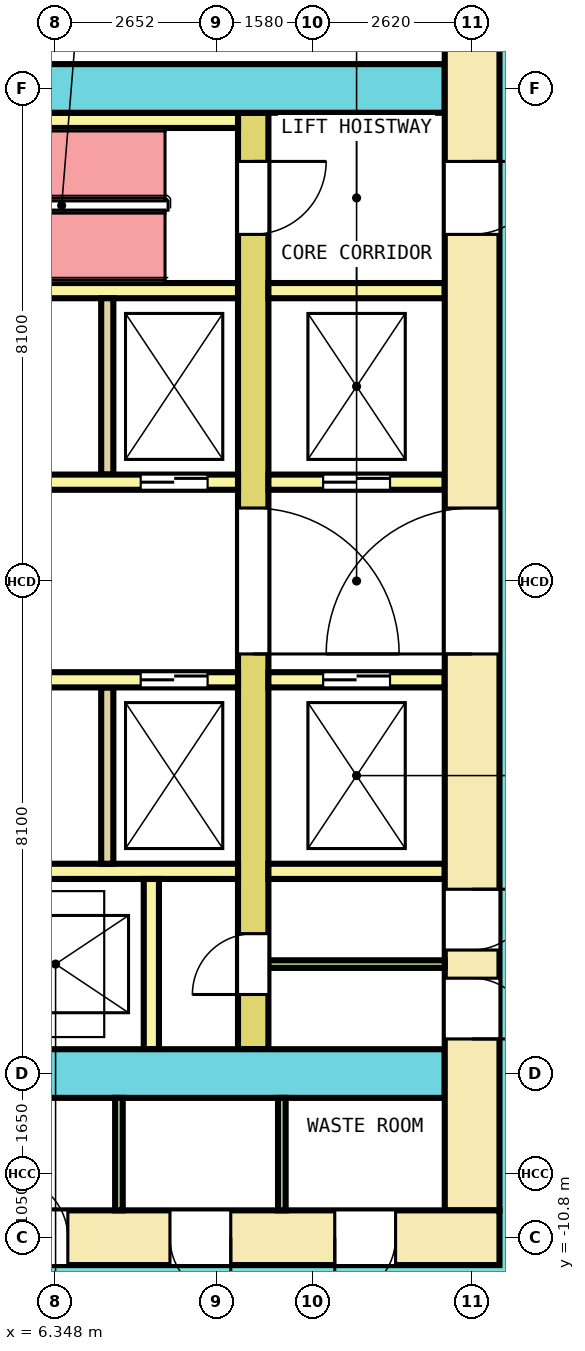
"""IFC4 building model, lengths in metres.
Left out: names, types, materials, properties, quantities, classifications, styles, units other than length and angle.
Written with IfcOpenShell. Run it as: python <this file> out.ifc"""

import sys

from ifc_helpers import new_model, si_unit, direction, frame, frame_2d, origin, place, context, subcontext, project, spatial, rectangle, extrude, element, fill, save


model = new_model("IFC4")
c1 = context("Model", 3, precision=1e-05, world=origin(), true_north=direction((0.0, 1.0)))
c2 = subcontext(c1, "Body", "Model", "MODEL_VIEW")
j1 = project(units=[si_unit("LENGTHUNIT", "METRE"), si_unit("PLANEANGLEUNIT", "RADIAN")], contexts=[c1])
p1 = place(None, origin())
s1 = spatial("IfcSite", under=j1, at=p1, CompositionType="ELEMENT")
p2 = place(p1, origin())
s2 = spatial("IfcBuilding", under=s1, at=p2, CompositionType="ELEMENT")
p3 = place(p2, frame((0.0, 0.0, 10.2)))
s3 = spatial("IfcBuildingStorey", under=s2, at=p3, CompositionType="ELEMENT", Elevation=10.2)
p4 = place(p3, frame((-13.65, -10.8, 0.0), z_axis=(0.0, 0.0, 1.0), x_axis=(1.0, 0.0, 0.0)))
e1 = element("IfcWall", 1, at=p4, inside=s3, PredefinedType="SHEAR", context=c2, shape_type="SweptSolid", body=[
    extrude(rectangle(XDim=27.3, YDim=0.9, at=frame_2d((13.65, 0.0))), origin(), (0.0, 0.0, 1.0), 4.1),
])
p5 = place(p4, frame((2.425, 0.0, 0.0)))
e2 = element("IfcOpeningElement", 2, at=p5, cuts=e1, PredefinedType="OPENING", context=c2, shape_type="SweptSolid", body=[
    extrude(rectangle(XDim=1.0, YDim=2.1, at=frame_2d((0.5, 1.05))), frame((0.0, 0.46, 0.0), z_axis=(0.0, -1.0, 0.0), x_axis=(1.0, 0.0, 0.0)), (0.0, 0.0, 1.0), 0.92),
])
p6 = place(p4, frame((6.569, 0.0, 0.0)))
e3 = element("IfcOpeningElement", 3, at=p6, cuts=e1, PredefinedType="OPENING", context=c2, shape_type="SweptSolid", body=[
    extrude(rectangle(XDim=1.0, YDim=2.1, at=frame_2d((0.5, 1.05))), frame((0.0, 0.46, 0.0), z_axis=(0.0, -1.0, 0.0), x_axis=(1.0, 0.0, 0.0)), (0.0, 0.0, 1.0), 0.92),
])
p7 = place(p4, frame((10.681, 0.0, 0.0)))
e4 = element("IfcOpeningElement", 4, at=p7, cuts=e1, PredefinedType="OPENING", context=c2, shape_type="SweptSolid", body=[
    extrude(rectangle(XDim=1.0, YDim=2.1, at=frame_2d((0.5, 1.05))), frame((0.0, 0.46, 0.0), z_axis=(0.0, -1.0, 0.0), x_axis=(1.0, 0.0, 0.0)), (0.0, 0.0, 1.0), 0.92),
])
p8 = place(p4, frame((19.202, 0.0, 0.0)))
e5 = element("IfcOpeningElement", 5, at=p8, cuts=e1, PredefinedType="OPENING", context=c2, shape_type="SweptSolid", body=[
    extrude(rectangle(XDim=1.0, YDim=2.1, at=frame_2d((0.5, 1.05))), frame((0.0, 0.46, 0.0), z_axis=(0.0, -1.0, 0.0), x_axis=(1.0, 0.0, 0.0)), (0.0, 0.0, 1.0), 0.92),
])
p9 = place(p4, frame((21.881, 0.0, 0.0)))
e6 = element("IfcOpeningElement", 6, at=p9, cuts=e1, PredefinedType="OPENING", context=c2, shape_type="SweptSolid", body=[
    extrude(rectangle(XDim=1.0, YDim=2.1, at=frame_2d((0.5, 1.05))), frame((0.0, 0.46, 0.0), z_axis=(0.0, -1.0, 0.0), x_axis=(1.0, 0.0, 0.0)), (0.0, 0.0, 1.0), 0.92),
])
p10 = place(p4, frame((24.592, 0.0, 0.0)))
e7 = element("IfcOpeningElement", 7, at=p10, cuts=e1, PredefinedType="OPENING", context=c2, shape_type="SweptSolid", body=[
    extrude(rectangle(XDim=1.0, YDim=2.1, at=frame_2d((0.5, 1.05))), frame((0.0, 0.46, 0.0), z_axis=(0.0, -1.0, 0.0), x_axis=(1.0, 0.0, 0.0)), (0.0, 0.0, 1.0), 0.92),
])
p11 = place(p4, frame((15.2, 0.0, 0.0)))
e8 = element("IfcOpeningElement", 8, at=p11, cuts=e1, PredefinedType="OPENING", context=c2, shape_type="SweptSolid", body=[
    extrude(rectangle(XDim=1.2, YDim=2.1, at=frame_2d((0.6, 1.05))), frame((0.0, 0.46, 0.0), z_axis=(0.0, -1.0, 0.0), x_axis=(1.0, 0.0, 0.0)), (0.0, 0.0, 1.0), 0.92),
])
p12 = place(p3, frame((13.2, -10.35, 0.0), z_axis=(0.0, 0.0, 1.0), x_axis=(0.0, 1.0, 0.0)))
e9 = element("IfcWall", 9, at=p12, inside=s3, PredefinedType="SHEAR", context=c2, shape_type="SweptSolid", body=[
    extrude(rectangle(XDim=20.7, YDim=0.9, at=frame_2d((10.35, 0.0))), origin(), (0.0, 0.0, 1.0), 4.1),
])
p13 = place(p12, frame((9.15, 0.0, 0.0)))
e10 = element("IfcOpeningElement", 10, at=p13, cuts=e9, PredefinedType="OPENING", context=c2, shape_type="SweptSolid", body=[
    extrude(rectangle(XDim=2.4, YDim=2.1, at=frame_2d((1.2, 1.05))), frame((0.0, 0.46, 0.0), z_axis=(0.0, -1.0, 0.0), x_axis=(1.0, 0.0, 0.0)), (0.0, 0.0, 1.0), 0.92),
])
p14 = place(p12, frame((16.05, 0.0, 0.0)))
e11 = element("IfcOpeningElement", 11, at=p14, cuts=e9, PredefinedType="OPENING", context=c2, shape_type="SweptSolid", body=[
    extrude(rectangle(XDim=1.2, YDim=2.1, at=frame_2d((0.6, 1.05))), frame((0.0, 0.46, 0.0), z_axis=(0.0, -1.0, 0.0), x_axis=(1.0, 0.0, 0.0)), (0.0, 0.0, 1.0), 0.92),
])
p15 = place(p12, frame((2.819, 0.0, 0.0)))
e12 = element("IfcOpeningElement", 12, at=p15, cuts=e9, PredefinedType="OPENING", context=c2, shape_type="SweptSolid", body=[
    extrude(rectangle(XDim=1.0, YDim=2.1, at=frame_2d((0.5, 1.05))), frame((0.0, 0.46, 0.0), z_axis=(0.0, -1.0, 0.0), x_axis=(1.0, 0.0, 0.0)), (0.0, 0.0, 1.0), 0.92),
])
p16 = place(p12, frame((4.281, 0.0, 0.0)))
e13 = element("IfcOpeningElement", 13, at=p16, cuts=e9, PredefinedType="OPENING", context=c2, shape_type="SweptSolid", body=[
    extrude(rectangle(XDim=1.0, YDim=2.1, at=frame_2d((0.5, 1.05))), frame((0.0, 0.46, 0.0), z_axis=(0.0, -1.0, 0.0), x_axis=(1.0, 0.0, 0.0)), (0.0, 0.0, 1.0), 0.92),
])
p17 = place(p3, frame((-12.75, 8.1, 0.0), z_axis=(0.0, 0.0, 1.0), x_axis=(1.0, 0.0, 0.0)))
e14 = element("IfcWall", 14, at=p17, inside=s3, PredefinedType="SHEAR", context=c2, shape_type="SweptSolid", body=[
    extrude(rectangle(XDim=25.5, YDim=0.8, at=frame_2d((12.75, 0.0))), origin(), (0.0, 0.0, 1.0), 4.1),
])
p18 = place(p17, frame((13.675, 0.0, 0.0)))
e15 = element("IfcOpeningElement", 15, at=p18, cuts=e14, PredefinedType="OPENING", context=c2, shape_type="SweptSolid", body=[
    extrude(rectangle(XDim=1.4, YDim=2.1, at=frame_2d((0.7, 1.05))), frame((0.0, 0.41, 0.0), z_axis=(0.0, -1.0, 0.0), x_axis=(1.0, 0.0, 0.0)), (0.0, 0.0, 1.0), 0.82),
])
p19 = place(p3, frame((-12.75, -8.1, 0.0), z_axis=(0.0, 0.0, 1.0), x_axis=(1.0, 0.0, 0.0)))
e16 = element("IfcWall", 16, at=p19, inside=s3, PredefinedType="SHEAR", context=c2, shape_type="SweptSolid", body=[
    extrude(rectangle(XDim=25.5, YDim=0.8, at=frame_2d((12.75, 0.0))), origin(), (0.0, 0.0, 1.0), 4.1),
])
p20 = place(p19, frame((14.3, 0.0, 0.0)))
e17 = element("IfcOpeningElement", 17, at=p20, cuts=e16, PredefinedType="OPENING", context=c2, shape_type="SweptSolid", body=[
    extrude(rectangle(XDim=1.2, YDim=2.1, at=frame_2d((0.6, 1.05))), frame((0.0, 0.41, 0.0), z_axis=(0.0, -1.0, 0.0), x_axis=(1.0, 0.0, 0.0)), (0.0, 0.0, 1.0), 0.82),
])
p21 = place(p3, frame((9.6, -7.7, 0.0), z_axis=(0.0, 0.0, 1.0), x_axis=(0.0, 1.0, 0.0)))
e18 = element("IfcWall", 18, at=p21, inside=s3, PredefinedType="SHEAR", context=c2, shape_type="SweptSolid", body=[
    extrude(rectangle(XDim=15.4, YDim=0.5, at=frame_2d((7.7, 0.0))), origin(), (0.0, 0.0, 1.0), 4.1),
])
p22 = place(p21, frame((6.5, 0.0, 0.0)))
e19 = element("IfcOpeningElement", 19, at=p22, cuts=e18, PredefinedType="OPENING", context=c2, shape_type="SweptSolid", body=[
    extrude(rectangle(XDim=2.4, YDim=2.1, at=frame_2d((1.2, 1.05))), frame((0.0, 0.26, 0.0), z_axis=(0.0, -1.0, 0.0), x_axis=(1.0, 0.0, 0.0)), (0.0, 0.0, 1.0), 0.52),
])
p23 = place(p21, frame((13.4, 0.0, 0.0)))
e20 = element("IfcOpeningElement", 20, at=p23, cuts=e18, PredefinedType="OPENING", context=c2, shape_type="SweptSolid", body=[
    extrude(rectangle(XDim=1.2, YDim=2.1, at=frame_2d((0.6, 1.05))), frame((0.0, 0.26, 0.0), z_axis=(0.0, -1.0, 0.0), x_axis=(1.0, 0.0, 0.0)), (0.0, 0.0, 1.0), 0.52),
])
p24 = place(p21, frame((0.9, 0.0, 0.0)))
e21 = element("IfcOpeningElement", 21, at=p24, cuts=e18, PredefinedType="OPENING", context=c2, shape_type="SweptSolid", body=[
    extrude(rectangle(XDim=1.0, YDim=2.1, at=frame_2d((0.5, 1.05))), frame((0.0, 0.26, 0.0), z_axis=(0.0, -1.0, 0.0), x_axis=(1.0, 0.0, 0.0)), (0.0, 0.0, 1.0), 0.52),
])
p25 = place(p3, frame((-9.35, 1.625, 0.0), z_axis=(0.0, 0.0, 1.0), x_axis=(1.0, 0.0, 0.0)))
e22 = element("IfcWall", 22, at=p25, inside=s3, PredefinedType="SOLIDWALL", context=c2, shape_type="SweptSolid", body=[
    extrude(rectangle(XDim=18.7, YDim=0.25, at=frame_2d((9.35, 0.0))), origin(), (0.0, 0.0, 1.0), 4.1),
])
p26 = place(p25, frame((0.5, 0.0, 0.0)))
e23 = element("IfcOpeningElement", 23, at=p26, cuts=e22, PredefinedType="OPENING", context=c2, shape_type="SweptSolid", body=[
    extrude(rectangle(XDim=1.1, YDim=2.1, at=frame_2d((0.55, 1.05))), frame((0.0, 0.135, 0.0), z_axis=(0.0, -1.0, 0.0), x_axis=(1.0, 0.0, 0.0)), (0.0, 0.0, 1.0), 0.27),
])
p27 = place(p25, frame((17.1, 0.0, 0.0)))
e24 = element("IfcOpeningElement", 24, at=p27, cuts=e22, PredefinedType="OPENING", context=c2, shape_type="SweptSolid", body=[
    extrude(rectangle(XDim=1.1, YDim=2.1, at=frame_2d((0.55, 1.05))), frame((0.0, 0.135, 0.0), z_axis=(0.0, -1.0, 0.0), x_axis=(1.0, 0.0, 0.0)), (0.0, 0.0, 1.0), 0.27),
])
p28 = place(p3, frame((9.85, 1.625, 0.0), z_axis=(0.0, 0.0, 1.0), x_axis=(1.0, 0.0, 0.0)))
e25 = element("IfcWall", 25, at=p28, inside=s3, PredefinedType="SOLIDWALL", context=c2, shape_type="SweptSolid", body=[
    extrude(rectangle(XDim=2.9, YDim=0.25, at=frame_2d((1.45, 0.0))), origin(), (0.0, 0.0, 1.0), 4.1),
])
p29 = place(p28, frame((0.9, 0.0, 0.0)))
e26 = element("IfcOpeningElement", 26, at=p29, cuts=e25, PredefinedType="OPENING", context=c2, shape_type="SweptSolid", body=[
    extrude(rectangle(XDim=1.1, YDim=2.1, at=frame_2d((0.55, 1.05))), frame((0.0, 0.135, 0.0), z_axis=(0.0, -1.0, 0.0), x_axis=(1.0, 0.0, 0.0)), (0.0, 0.0, 1.0), 0.27),
])
p30 = place(p3, frame((-9.35, 4.775, 0.0), z_axis=(0.0, 0.0, 1.0), x_axis=(1.0, 0.0, 0.0)))
e27 = element("IfcWall", 27, at=p30, inside=s3, PredefinedType="SOLIDWALL", context=c2, shape_type="SweptSolid", body=[
    extrude(rectangle(XDim=18.7, YDim=0.25, at=frame_2d((9.35, 0.0))), origin(), (0.0, 0.0, 1.0), 4.1),
])
p31 = place(p3, frame((9.85, 4.775, 0.0), z_axis=(0.0, 0.0, 1.0), x_axis=(1.0, 0.0, 0.0)))
e28 = element("IfcWall", 28, at=p31, inside=s3, PredefinedType="SOLIDWALL", context=c2, shape_type="SweptSolid", body=[
    extrude(rectangle(XDim=2.9, YDim=0.25, at=frame_2d((1.45, 0.0))), origin(), (0.0, 0.0, 1.0), 4.1),
])
p32 = place(p3, frame((7.2, 1.75, 0.0), z_axis=(0.0, 0.0, 1.0), x_axis=(0.0, 1.0, 0.0)))
e29 = element("IfcWall", 29, at=p32, inside=s3, PredefinedType="SOLIDWALL", context=c2, shape_type="SweptSolid", body=[
    extrude(rectangle(XDim=2.9, YDim=0.2, at=frame_2d((1.45, 0.0))), origin(), (0.0, 0.0, 1.0), 4.1),
])
p33 = place(p3, frame((-9.35, -1.625, 0.0), z_axis=(0.0, 0.0, 1.0), x_axis=(1.0, 0.0, 0.0)))
e30 = element("IfcWall", 30, at=p33, inside=s3, PredefinedType="SOLIDWALL", context=c2, shape_type="SweptSolid", body=[
    extrude(rectangle(XDim=18.7, YDim=0.25, at=frame_2d((9.35, 0.0))), origin(), (0.0, 0.0, 1.0), 4.1),
])
p34 = place(p33, frame((0.5, 0.0, 0.0)))
e31 = element("IfcOpeningElement", 31, at=p34, cuts=e30, PredefinedType="OPENING", context=c2, shape_type="SweptSolid", body=[
    extrude(rectangle(XDim=1.1, YDim=2.1, at=frame_2d((0.55, 1.05))), frame((0.0, 0.135, 0.0), z_axis=(0.0, -1.0, 0.0), x_axis=(1.0, 0.0, 0.0)), (0.0, 0.0, 1.0), 0.27),
])
p35 = place(p33, frame((17.1, 0.0, 0.0)))
e32 = element("IfcOpeningElement", 32, at=p35, cuts=e30, PredefinedType="OPENING", context=c2, shape_type="SweptSolid", body=[
    extrude(rectangle(XDim=1.1, YDim=2.1, at=frame_2d((0.55, 1.05))), frame((0.0, 0.135, 0.0), z_axis=(0.0, -1.0, 0.0), x_axis=(1.0, 0.0, 0.0)), (0.0, 0.0, 1.0), 0.27),
])
p36 = place(p3, frame((9.85, -1.625, 0.0), z_axis=(0.0, 0.0, 1.0), x_axis=(1.0, 0.0, 0.0)))
e33 = element("IfcWall", 33, at=p36, inside=s3, PredefinedType="SOLIDWALL", context=c2, shape_type="SweptSolid", body=[
    extrude(rectangle(XDim=2.9, YDim=0.25, at=frame_2d((1.45, 0.0))), origin(), (0.0, 0.0, 1.0), 4.1),
])
p37 = place(p36, frame((0.9, 0.0, 0.0)))
e34 = element("IfcOpeningElement", 34, at=p37, cuts=e33, PredefinedType="OPENING", context=c2, shape_type="SweptSolid", body=[
    extrude(rectangle(XDim=1.1, YDim=2.1, at=frame_2d((0.55, 1.05))), frame((0.0, 0.135, 0.0), z_axis=(0.0, -1.0, 0.0), x_axis=(1.0, 0.0, 0.0)), (0.0, 0.0, 1.0), 0.27),
])
p38 = place(p3, frame((-9.35, -4.775, 0.0), z_axis=(0.0, 0.0, 1.0), x_axis=(1.0, 0.0, 0.0)))
e35 = element("IfcWall", 35, at=p38, inside=s3, PredefinedType="SOLIDWALL", context=c2, shape_type="SweptSolid", body=[
    extrude(rectangle(XDim=18.7, YDim=0.25, at=frame_2d((9.35, 0.0))), origin(), (0.0, 0.0, 1.0), 4.1),
])
p39 = place(p3, frame((9.85, -4.775, 0.0), z_axis=(0.0, 0.0, 1.0), x_axis=(1.0, 0.0, 0.0)))
e36 = element("IfcWall", 36, at=p39, inside=s3, PredefinedType="SOLIDWALL", context=c2, shape_type="SweptSolid", body=[
    extrude(rectangle(XDim=2.9, YDim=0.25, at=frame_2d((1.45, 0.0))), origin(), (0.0, 0.0, 1.0), 4.1),
])
p40 = place(p3, frame((7.2, -4.65, 0.0), z_axis=(0.0, 0.0, 1.0), x_axis=(0.0, 1.0, 0.0)))
e37 = element("IfcWall", 37, at=p40, inside=s3, PredefinedType="SOLIDWALL", context=c2, shape_type="SweptSolid", body=[
    extrude(rectangle(XDim=2.9, YDim=0.2, at=frame_2d((1.45, 0.0))), origin(), (0.0, 0.0, 1.0), 4.1),
])
p41 = place(p3, frame((3.55, 7.575, 0.0), z_axis=(0.0, 0.0, 1.0), x_axis=(1.0, 0.0, 0.0)))
e38 = element("IfcWall", 38, at=p41, inside=s3, PredefinedType="SOLIDWALL", context=c2, shape_type="SweptSolid", body=[
    extrude(rectangle(XDim=5.8, YDim=0.25, at=frame_2d((2.9, 0.0))), origin(), (0.0, 0.0, 1.0), 4.1),
])
p42 = place(p3, frame((7.925, -7.7, 0.0), z_axis=(0.0, 0.0, 1.0), x_axis=(0.0, 1.0, 0.0)))
e39 = element("IfcWall", 39, at=p42, inside=s3, PredefinedType="SOLIDWALL", context=c2, shape_type="SweptSolid", body=[
    extrude(rectangle(XDim=2.8, YDim=0.25, at=frame_2d((1.4, 0.0))), origin(), (0.0, 0.0, 1.0), 4.1),
])
p43 = place(p3, frame((9.85, -6.3, 0.0), z_axis=(0.0, 0.0, 1.0), x_axis=(1.0, 0.0, 0.0)))
e40 = element("IfcWall", 40, at=p43, inside=s3, PredefinedType="PARTITIONING", context=c2, shape_type="SweptSolid", body=[
    extrude(rectangle(XDim=2.9, YDim=0.125, at=frame_2d((1.45, 0.0))), origin(), (0.0, 0.0, 1.0), 4.1),
])
for number, where, z_axis, x_axis in (
    (41, (7.392, -10.35, 0.0), (0.0, 0.0, 1.0), (0.0, 1.0, 0.0)),
    (42, (10.071, -10.35, 0.0), (0.0, 0.0, 1.0), (0.0, 1.0, 0.0)),
):
    element("IfcWall", number, at=place(p3, frame(where, z_axis=z_axis, x_axis=x_axis)), inside=s3, PredefinedType="PARTITIONING", context=c2, shape_type="SweptSolid", body=[
        extrude(rectangle(XDim=1.85, YDim=0.125, at=frame_2d((0.925, 0.0))), origin(), (0.0, 0.0, 1.0), 4.1),
    ])
p44 = place(p27, origin())
e43 = element("IfcDoor", 43, at=p44, inside=s3, OperationType="DOUBLE_DOOR_SLIDING", PredefinedType="DOOR", context=c2, shape_type="SweptSolid", body=[
    extrude(rectangle(XDim=1.1, YDim=2.1, at=frame_2d((0.55, 1.05))), frame((0.0, 0.075, 0.0), z_axis=(0.0, -1.0, 0.0), x_axis=(1.0, 0.0, 0.0)), (0.0, 0.0, 1.0), 0.15),
])
fill(e24, e43)
p45 = place(p29, origin())
e44 = element("IfcDoor", 44, at=p45, inside=s3, OperationType="DOUBLE_DOOR_SLIDING", PredefinedType="DOOR", context=c2, shape_type="SweptSolid", body=[
    extrude(rectangle(XDim=1.1, YDim=2.1, at=frame_2d((0.55, 1.05))), frame((0.0, 0.075, 0.0), z_axis=(0.0, -1.0, 0.0), x_axis=(1.0, 0.0, 0.0)), (0.0, 0.0, 1.0), 0.15),
])
fill(e26, e44)
p46 = place(p35, origin())
e45 = element("IfcDoor", 45, at=p46, inside=s3, OperationType="DOUBLE_DOOR_SLIDING", PredefinedType="DOOR", context=c2, shape_type="SweptSolid", body=[
    extrude(rectangle(XDim=1.1, YDim=2.1, at=frame_2d((0.55, 1.05))), frame((0.0, 0.075, 0.0), z_axis=(0.0, -1.0, 0.0), x_axis=(1.0, 0.0, 0.0)), (0.0, 0.0, 1.0), 0.15),
])
fill(e32, e45)
p47 = place(p37, origin())
e46 = element("IfcDoor", 46, at=p47, inside=s3, OperationType="DOUBLE_DOOR_SLIDING", PredefinedType="DOOR", context=c2, shape_type="SweptSolid", body=[
    extrude(rectangle(XDim=1.1, YDim=2.1, at=frame_2d((0.55, 1.05))), frame((0.0, 0.075, 0.0), z_axis=(0.0, -1.0, 0.0), x_axis=(1.0, 0.0, 0.0)), (0.0, 0.0, 1.0), 0.15),
])
fill(e34, e46)
p48 = place(p22, origin())
e47 = element("IfcDoor", 47, at=p48, inside=s3, OperationType="DOUBLE_DOOR_SINGLE_SWING", PredefinedType="DOOR", context=c2, shape_type="SweptSolid", body=[
    extrude(rectangle(XDim=2.4, YDim=2.1, at=frame_2d((1.2, 1.05))), frame((0.0, 0.2, 0.0), z_axis=(0.0, -1.0, 0.0), x_axis=(1.0, 0.0, 0.0)), (0.0, 0.0, 1.0), 0.4),
])
fill(e19, e47)
p49 = place(p13, origin())
e48 = element("IfcDoor", 48, at=p49, inside=s3, OperationType="DOUBLE_DOOR_SINGLE_SWING", PredefinedType="DOOR", context=c2, shape_type="SweptSolid", body=[
    extrude(rectangle(XDim=2.4, YDim=2.1, at=frame_2d((1.2, 1.05))), frame((0.0, 0.3, 0.0), z_axis=(0.0, -1.0, 0.0), x_axis=(1.0, 0.0, 0.0)), (0.0, 0.0, 1.0), 0.6),
])
fill(e10, e48)
p50 = place(p23, origin())
e49 = element("IfcDoor", 49, at=p50, inside=s3, OperationType="SINGLE_SWING_LEFT", PredefinedType="DOOR", context=c2, shape_type="SweptSolid", body=[
    extrude(rectangle(XDim=1.2, YDim=2.1, at=frame_2d((0.6, 1.05))), frame((0.0, 0.2, 0.0), z_axis=(0.0, -1.0, 0.0), x_axis=(1.0, 0.0, 0.0)), (0.0, 0.0, 1.0), 0.4),
])
fill(e20, e49)
p51 = place(p14, origin())
e50 = element("IfcDoor", 50, at=p51, inside=s3, OperationType="SINGLE_SWING_RIGHT", PredefinedType="DOOR", context=c2, shape_type="SweptSolid", body=[
    extrude(rectangle(XDim=1.2, YDim=2.1, at=frame_2d((0.6, 1.05))), frame((0.0, 0.3, 0.0), z_axis=(0.0, -1.0, 0.0), x_axis=(1.0, 0.0, 0.0)), (0.0, 0.0, 1.0), 0.6),
])
fill(e11, e50)
p52 = place(p24, origin())
e51 = element("IfcDoor", 51, at=p52, inside=s3, OperationType="SINGLE_SWING_LEFT", PredefinedType="DOOR", context=c2, shape_type="SweptSolid", body=[
    extrude(rectangle(XDim=1.0, YDim=2.1, at=frame_2d((0.5, 1.05))), frame((0.0, 0.2, 0.0), z_axis=(0.0, -1.0, 0.0), x_axis=(1.0, 0.0, 0.0)), (0.0, 0.0, 1.0), 0.4),
])
fill(e21, e51)
p53 = place(p15, origin())
e52 = element("IfcDoor", 52, at=p53, inside=s3, OperationType="SINGLE_SWING_RIGHT", PredefinedType="DOOR", context=c2, shape_type="SweptSolid", body=[
    extrude(rectangle(XDim=1.0, YDim=2.1, at=frame_2d((0.5, 1.05))), frame((0.0, 0.3, 0.0), z_axis=(0.0, -1.0, 0.0), x_axis=(1.0, 0.0, 0.0)), (0.0, 0.0, 1.0), 0.6),
])
fill(e12, e52)
p54 = place(p16, origin())
e53 = element("IfcDoor", 53, at=p54, inside=s3, OperationType="SINGLE_SWING_LEFT", PredefinedType="DOOR", context=c2, shape_type="SweptSolid", body=[
    extrude(rectangle(XDim=1.0, YDim=2.1, at=frame_2d((0.5, 1.05))), frame((0.0, 0.3, 0.0), z_axis=(0.0, -1.0, 0.0), x_axis=(1.0, 0.0, 0.0)), (0.0, 0.0, 1.0), 0.6),
])
fill(e13, e53)
p55 = place(p8, origin())
e54 = element("IfcDoor", 54, at=p55, inside=s3, OperationType="SINGLE_SWING_LEFT", PredefinedType="DOOR", context=c2, shape_type="SweptSolid", body=[
    extrude(rectangle(XDim=1.0, YDim=2.1, at=frame_2d((0.5, 1.05))), frame((0.0, 0.3, 0.0), z_axis=(0.0, -1.0, 0.0), x_axis=(1.0, 0.0, 0.0)), (0.0, 0.0, 1.0), 0.6),
])
fill(e5, e54)
p56 = place(p9, origin())
e55 = element("IfcDoor", 55, at=p56, inside=s3, OperationType="SINGLE_SWING_RIGHT", PredefinedType="DOOR", context=c2, shape_type="SweptSolid", body=[
    extrude(rectangle(XDim=1.0, YDim=2.1, at=frame_2d((0.5, 1.05))), frame((0.0, 0.3, 0.0), z_axis=(0.0, -1.0, 0.0), x_axis=(1.0, 0.0, 0.0)), (0.0, 0.0, 1.0), 0.6),
])
fill(e6, e55)
p57 = place(p10, origin())
e56 = element("IfcDoor", 56, at=p57, inside=s3, OperationType="SINGLE_SWING_LEFT", PredefinedType="DOOR", context=c2, shape_type="SweptSolid", body=[
    extrude(rectangle(XDim=1.0, YDim=2.1, at=frame_2d((0.5, 1.05))), frame((0.0, 0.3, 0.0), z_axis=(0.0, -1.0, 0.0), x_axis=(1.0, 0.0, 0.0)), (0.0, 0.0, 1.0), 0.6),
])
fill(e7, e56)
save(model, sys.argv[1])
